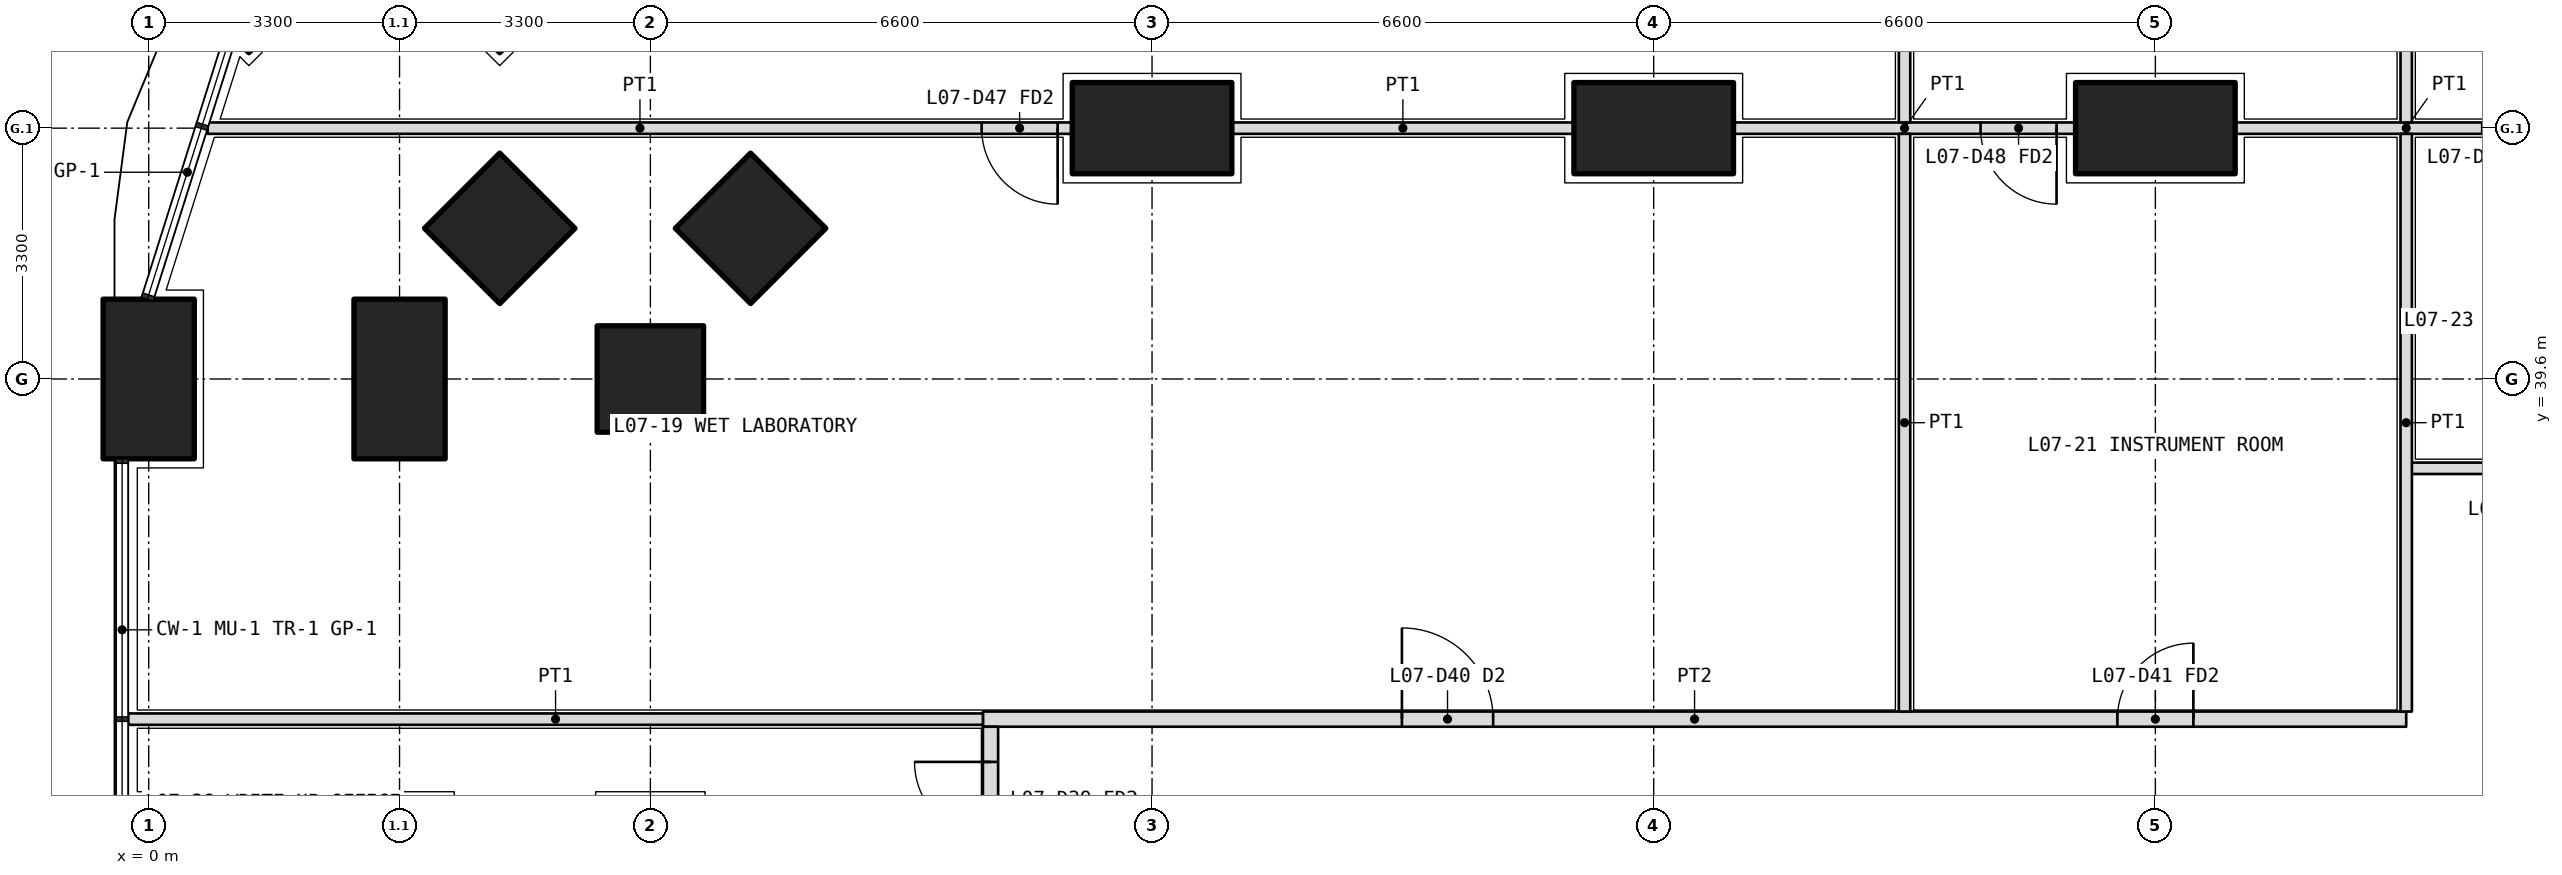
"""IFC4 building model, lengths in metres.
Left out: names, types, materials, properties, quantities, classifications, styles, units other than length and angle.
Written with IfcOpenShell. Run it as: python <this file> out.ifc"""

import sys

from ifc_helpers import new_model, si_unit, direction, frame, frame_2d, origin, origin_2d, place, context, subcontext, project, spatial, rectangle, extrude, element, fill, save


model = new_model("IFC4")
c1 = context("Model", 3, precision=1e-05, world=origin(), true_north=direction((0.0, 1.0)))
c2 = subcontext(c1, "Body", "Model", "MODEL_VIEW")
j1 = project(units=[si_unit("LENGTHUNIT", "METRE"), si_unit("PLANEANGLEUNIT", "RADIAN")], contexts=[c1])
p1 = place(None, origin())
s1 = spatial("IfcSite", under=j1, at=p1, CompositionType="ELEMENT")
p2 = place(p1, origin())
s2 = spatial("IfcBuilding", under=s1, at=p2, CompositionType="ELEMENT")
p3 = place(p2, frame((0.0, 0.0, 33.9)))
s3 = spatial("IfcBuildingStorey", under=s2, at=p3, CompositionType="ELEMENT", Elevation=33.9)
p4 = place(p3, frame((1.318, 44.882, 0.0), z_axis=(0.0, 0.0, 1.0), x_axis=(0.707106781187, 0.707106781187, 0.0)))
e1 = element("IfcColumn", 1, at=p4, inside=s3, PredefinedType="COLUMN", context=c2, shape_type="SweptSolid", body=[
    extrude(rectangle(XDim=1.4, YDim=1.4, at=origin_2d()), origin(), (0.0, 0.0, 1.0), 4.2),
])
p5 = place(p3, frame((0.0, 39.6, 0.0), z_axis=(0.0, 0.0, 1.0), x_axis=(0.0, 1.0, 0.0)))
e2 = element("IfcColumn", 2, at=p5, inside=s3, PredefinedType="COLUMN", context=c2, shape_type="SweptSolid", body=[
    extrude(rectangle(XDim=2.1, YDim=1.2, at=origin_2d()), origin(), (0.0, 0.0, 1.0), 4.2),
])
for number, where, z_axis, x_axis in (
    (3, (6.6, 39.6, 0.0), (0.0, 0.0, 1.0), (1.0, 0.0, 0.0)),
    (4, (4.618, 44.882, 0.0), (0.0, 0.0, 1.0), (0.707, 0.707, 0.0)),
):
    element("IfcColumn", number, at=place(p3, frame(where, z_axis=z_axis, x_axis=x_axis)), inside=s3, PredefinedType="COLUMN", context=c2, shape_type="SweptSolid", body=[
        extrude(rectangle(XDim=1.4, YDim=1.4, at=origin_2d()), origin(), (0.0, 0.0, 1.0), 4.2),
    ])
p6 = place(p3, frame((3.3, 39.6, 0.0), z_axis=(0.0, 0.0, 1.0), x_axis=(0.0, 1.0, 0.0)))
e5 = element("IfcColumn", 5, at=p6, inside=s3, PredefinedType="COLUMN", context=c2, shape_type="SweptSolid", body=[
    extrude(rectangle(XDim=2.1, YDim=1.2, at=origin_2d()), origin(), (0.0, 0.0, 1.0), 4.2),
])
p7 = place(p3, frame((4.618, 41.582, 0.0), z_axis=(0.0, 0.0, 1.0), x_axis=(0.707106781187, 0.707106781187, 0.0)))
e6 = element("IfcColumn", 6, at=p7, inside=s3, PredefinedType="COLUMN", context=c2, shape_type="SweptSolid", body=[
    extrude(rectangle(XDim=1.4, YDim=1.4, at=origin_2d()), origin(), (0.0, 0.0, 1.0), 4.2),
])
for number, where, z_axis, x_axis in (
    (7, (13.2, 42.9, 0.0), (0.0, 0.0, 1.0), (1.0, 0.0, 0.0)),
    (8, (19.8, 42.9, 0.0), (0.0, 0.0, 1.0), (1.0, 0.0, 0.0)),
    (9, (26.4, 42.9, 0.0), (0.0, 0.0, 1.0), (1.0, 0.0, 0.0)),
):
    element("IfcColumn", number, at=place(p3, frame(where, z_axis=z_axis, x_axis=x_axis)), inside=s3, PredefinedType="COLUMN", context=c2, shape_type="SweptSolid", body=[
        extrude(rectangle(XDim=2.1, YDim=1.2, at=origin_2d()), origin(), (0.0, 0.0, 1.0), 4.2),
    ])
p8 = place(p3, frame((7.918, 41.582, 0.0), z_axis=(0.0, 0.0, 1.0), x_axis=(0.707106781187, 0.707106781187, 0.0)))
e10 = element("IfcColumn", 10, at=p8, inside=s3, PredefinedType="COLUMN", context=c2, shape_type="SweptSolid", body=[
    extrude(rectangle(XDim=1.4, YDim=1.4, at=origin_2d()), origin(), (0.0, 0.0, 1.0), 4.2),
])
p9 = place(p3, frame((10.975, 35.125, 0.0), z_axis=(0.0, 0.0, 1.0), x_axis=(1.0, 0.0, 0.0)))
e11 = element("IfcWall", 11, at=p9, inside=s3, PredefinedType="PARTITIONING", context=c2, shape_type="SweptSolid", body=[
    extrude(rectangle(XDim=18.725, YDim=0.2, at=frame_2d((9.362, 0.0))), origin(), (0.0, 0.0, 1.0), 2.85),
])
p10 = place(p9, frame((5.512, 0.0, 0.0)))
e12 = element("IfcOpeningElement", 12, at=p10, cuts=e11, PredefinedType="OPENING", context=c2, shape_type="SweptSolid", body=[
    extrude(rectangle(XDim=1.2, YDim=2.1, at=frame_2d((0.6, 1.05))), frame((0.0, 0.11, 0.0), z_axis=(0.0, -1.0, 0.0), x_axis=(1.0, 0.0, 0.0)), (0.0, 0.0, 1.0), 0.22),
])
p11 = place(p9, frame((14.925, 0.0, 0.0)))
e13 = element("IfcOpeningElement", 13, at=p11, cuts=e11, PredefinedType="OPENING", context=c2, shape_type="SweptSolid", body=[
    extrude(rectangle(XDim=1.0, YDim=2.1, at=frame_2d((0.5, 1.05))), frame((0.0, 0.11, 0.0), z_axis=(0.0, -1.0, 0.0), x_axis=(1.0, 0.0, 0.0)), (0.0, 0.0, 1.0), 0.22),
])
p12 = place(p3, frame((11.075, 11.175, 0.0), z_axis=(0.0, 0.0, 1.0), x_axis=(0.0, 1.0, 0.0)))
e14 = element("IfcWall", 14, at=p12, inside=s3, PredefinedType="PARTITIONING", context=c2, shape_type="SweptSolid", body=[
    extrude(rectangle(XDim=23.85, YDim=0.2, at=frame_2d((11.925, 0.0))), origin(), (0.0, 0.0, 1.0), 2.85),
])
p13 = place(p12, frame((0.363, 0.0, 0.0)))
e15 = element("IfcOpeningElement", 15, at=p13, cuts=e14, PredefinedType="OPENING", context=c2, shape_type="SweptSolid", body=[
    extrude(rectangle(XDim=1.2, YDim=2.1, at=frame_2d((0.6, 1.05))), frame((0.0, 0.11, 0.0), z_axis=(0.0, -1.0, 0.0), x_axis=(1.0, 0.0, 0.0)), (0.0, 0.0, 1.0), 0.22),
])
p14 = place(p12, frame((2.575, 0.0, 0.0)))
e16 = element("IfcOpeningElement", 16, at=p14, cuts=e14, PredefinedType="OPENING", context=c2, shape_type="SweptSolid", body=[
    extrude(rectangle(XDim=1.0, YDim=2.1, at=frame_2d((0.5, 1.05))), frame((0.0, 0.11, 0.0), z_axis=(0.0, -1.0, 0.0), x_axis=(1.0, 0.0, 0.0)), (0.0, 0.0, 1.0), 0.22),
])
p15 = place(p12, frame((5.65, 0.0, 0.0)))
e17 = element("IfcOpeningElement", 17, at=p15, cuts=e14, PredefinedType="OPENING", context=c2, shape_type="SweptSolid", body=[
    extrude(rectangle(XDim=0.9, YDim=2.1, at=frame_2d((0.45, 1.05))), frame((0.0, 0.11, 0.0), z_axis=(0.0, -1.0, 0.0), x_axis=(1.0, 0.0, 0.0)), (0.0, 0.0, 1.0), 0.22),
])
p16 = place(p12, frame((9.5, 0.0, 0.0)))
e18 = element("IfcOpeningElement", 18, at=p16, cuts=e14, PredefinedType="OPENING", context=c2, shape_type="SweptSolid", body=[
    extrude(rectangle(XDim=0.9, YDim=2.1, at=frame_2d((0.45, 1.05))), frame((0.0, 0.11, 0.0), z_axis=(0.0, -1.0, 0.0), x_axis=(1.0, 0.0, 0.0)), (0.0, 0.0, 1.0), 0.22),
])
p17 = place(p12, frame((13.025, 0.0, 0.0)))
e19 = element("IfcOpeningElement", 19, at=p17, cuts=e14, PredefinedType="OPENING", context=c2, shape_type="SweptSolid", body=[
    extrude(rectangle(XDim=1.0, YDim=2.1, at=frame_2d((0.5, 1.05))), frame((0.0, 0.11, 0.0), z_axis=(0.0, -1.0, 0.0), x_axis=(1.0, 0.0, 0.0)), (0.0, 0.0, 1.0), 0.22),
])
p18 = place(p12, frame((16.375, 0.0, 0.0)))
e20 = element("IfcOpeningElement", 20, at=p18, cuts=e14, PredefinedType="OPENING", context=c2, shape_type="SweptSolid", body=[
    extrude(rectangle(XDim=1.0, YDim=2.1, at=frame_2d((0.5, 1.05))), frame((0.0, 0.11, 0.0), z_axis=(0.0, -1.0, 0.0), x_axis=(1.0, 0.0, 0.0)), (0.0, 0.0, 1.0), 0.22),
])
p19 = place(p12, frame((19.675, 0.0, 0.0)))
e21 = element("IfcOpeningElement", 21, at=p19, cuts=e14, PredefinedType="OPENING", context=c2, shape_type="SweptSolid", body=[
    extrude(rectangle(XDim=1.0, YDim=2.1, at=frame_2d((0.5, 1.05))), frame((0.0, 0.11, 0.0), z_axis=(0.0, -1.0, 0.0), x_axis=(1.0, 0.0, 0.0)), (0.0, 0.0, 1.0), 0.22),
])
p20 = place(p12, frame((22.387, 0.0, 0.0)))
e22 = element("IfcOpeningElement", 22, at=p20, cuts=e14, PredefinedType="OPENING", context=c2, shape_type="SweptSolid", body=[
    extrude(rectangle(XDim=1.0, YDim=2.1, at=frame_2d((0.5, 1.05))), frame((0.0, 0.11, 0.0), z_axis=(0.0, -1.0, 0.0), x_axis=(1.0, 0.0, 0.0)), (0.0, 0.0, 1.0), 0.22),
])
p21 = place(p3, frame((-0.27, 35.125, 0.0), z_axis=(0.0, 0.0, 1.0), x_axis=(1.0, 0.0, 0.0)))
e23 = element("IfcWall", 23, at=p21, inside=s3, PredefinedType="PARTITIONING", context=c2, shape_type="SweptSolid", body=[
    extrude(rectangle(XDim=11.245, YDim=0.15, at=frame_2d((5.623, 0.0))), origin(), (0.0, 0.0, 1.0), 2.7),
])
p22 = place(p3, frame((31.95, 42.9, 0.0), z_axis=(0.0, 0.0, 1.0), x_axis=(-1.0, 0.0, 0.0)))
e24 = element("IfcWall", 24, at=p22, inside=s3, PredefinedType="PARTITIONING", context=c2, shape_type="SweptSolid", body=[
    extrude(rectangle(XDim=4.5, YDim=0.15, at=frame_2d((2.25, 0.0))), origin(), (0.0, 0.0, 1.0), 3.9),
])
p23 = place(p22, frame((0.25, 0.0, 0.0)))
e25 = element("IfcOpeningElement", 25, at=p23, cuts=e24, PredefinedType="OPENING", context=c2, shape_type="SweptSolid", body=[
    extrude(rectangle(XDim=1.0, YDim=2.1, at=frame_2d((0.5, 1.05))), frame((0.0, 0.085, 0.0), z_axis=(0.0, -1.0, 0.0), x_axis=(1.0, 0.0, 0.0)), (0.0, 0.0, 1.0), 0.17),
])
p24 = place(p3, frame((25.35, 42.9, 0.0), z_axis=(0.0, 0.0, 1.0), x_axis=(-1.0, 0.0, 0.0)))
e26 = element("IfcWall", 26, at=p24, inside=s3, PredefinedType="PARTITIONING", context=c2, shape_type="SweptSolid", body=[
    extrude(rectangle(XDim=4.5, YDim=0.15, at=frame_2d((2.25, 0.0))), origin(), (0.0, 0.0, 1.0), 3.9),
])
p25 = place(p24, frame((0.25, 0.0, 0.0)))
e27 = element("IfcOpeningElement", 27, at=p25, cuts=e26, PredefinedType="OPENING", context=c2, shape_type="SweptSolid", body=[
    extrude(rectangle(XDim=1.0, YDim=2.1, at=frame_2d((0.5, 1.05))), frame((0.0, 0.085, 0.0), z_axis=(0.0, -1.0, 0.0), x_axis=(1.0, 0.0, 0.0)), (0.0, 0.0, 1.0), 0.17),
])
p26 = place(p3, frame((18.75, 42.9, 0.0), z_axis=(0.0, 0.0, 1.0), x_axis=(-1.0, 0.0, 0.0)))
e28 = element("IfcWall", 28, at=p26, inside=s3, PredefinedType="PARTITIONING", context=c2, shape_type="SweptSolid", body=[
    extrude(rectangle(XDim=4.5, YDim=0.15, at=frame_2d((2.25, 0.0))), origin(), (0.0, 0.0, 1.0), 3.9),
])
p27 = place(p3, frame((12.15, 42.9, 0.0), z_axis=(0.0, 0.0, 1.0), x_axis=(-1.0, 0.0, 0.0)))
e29 = element("IfcWall", 29, at=p27, inside=s3, PredefinedType="PARTITIONING", context=c2, shape_type="SweptSolid", body=[
    extrude(rectangle(XDim=11.374, YDim=0.15, at=frame_2d((5.687, 0.0))), origin(), (0.0, 0.0, 1.0), 2.7),
])
p28 = place(p27, frame((0.192, 0.0, 0.0)))
e30 = element("IfcOpeningElement", 30, at=p28, cuts=e29, PredefinedType="OPENING", context=c2, shape_type="SweptSolid", body=[
    extrude(rectangle(XDim=1.0, YDim=2.1, at=frame_2d((0.5, 1.05))), frame((0.0, 0.085, 0.0), z_axis=(0.0, -1.0, 0.0), x_axis=(1.0, 0.0, 0.0)), (0.0, 0.0, 1.0), 0.17),
])
p29 = place(p3, frame((29.7, 38.425, 0.0), z_axis=(0.0, 0.0, 1.0), x_axis=(1.0, 0.0, 0.0)))
e31 = element("IfcWall", 31, at=p29, inside=s3, PredefinedType="PARTITIONING", context=c2, shape_type="SweptSolid", body=[
    extrude(rectangle(XDim=3.3, YDim=0.15, at=frame_2d((1.65, 0.0))), origin(), (0.0, 0.0, 1.0), 2.85),
])
p30 = place(p29, frame((1.15, 0.0, 0.0)))
e32 = element("IfcOpeningElement", 32, at=p30, cuts=e31, PredefinedType="OPENING", context=c2, shape_type="SweptSolid", body=[
    extrude(rectangle(XDim=1.0, YDim=2.1, at=frame_2d((0.5, 1.05))), frame((0.0, 0.085, 0.0), z_axis=(0.0, -1.0, 0.0), x_axis=(1.0, 0.0, 0.0)), (0.0, 0.0, 1.0), 0.17),
])
p31 = place(p3, frame((23.1, 46.47, 0.0), z_axis=(0.0, 0.0, 1.0), x_axis=(0.0, -1.0, 0.0)))
e33 = element("IfcWall", 33, at=p31, inside=s3, PredefinedType="PARTITIONING", context=c2, shape_type="SweptSolid", body=[
    extrude(rectangle(XDim=3.495, YDim=0.15, at=frame_2d((1.748, 0.0))), origin(), (0.0, 0.0, 1.0), 2.7),
])
p32 = place(p3, frame((23.1, 42.825, 0.0), z_axis=(0.0, 0.0, 1.0), x_axis=(0.0, -1.0, 0.0)))
e34 = element("IfcWall", 34, at=p32, inside=s3, PredefinedType="PARTITIONING", context=c2, shape_type="SweptSolid", body=[
    extrude(rectangle(XDim=7.6, YDim=0.15, at=frame_2d((3.8, 0.0))), origin(), (0.0, 0.0, 1.0), 3.9),
])
p33 = place(p3, frame((29.7, 46.47, 0.0), z_axis=(0.0, 0.0, 1.0), x_axis=(0.0, -1.0, 0.0)))
e35 = element("IfcWall", 35, at=p33, inside=s3, PredefinedType="PARTITIONING", context=c2, shape_type="SweptSolid", body=[
    extrude(rectangle(XDim=3.495, YDim=0.15, at=frame_2d((1.748, 0.0))), origin(), (0.0, 0.0, 1.0), 2.7),
])
p34 = place(p3, frame((29.7, 42.825, 0.0), z_axis=(0.0, 0.0, 1.0), x_axis=(0.0, -1.0, 0.0)))
e36 = element("IfcWall", 36, at=p34, inside=s3, PredefinedType="PARTITIONING", context=c2, shape_type="SweptSolid", body=[
    extrude(rectangle(XDim=7.6, YDim=0.15, at=frame_2d((3.8, 0.0))), origin(), (0.0, 0.0, 1.0), 3.9),
])
p35 = place(p10, origin())
e37 = element("IfcDoor", 37, at=p35, inside=s3, OperationType="DOUBLE_DOOR_SINGLE_SWING", PredefinedType="DOOR", context=c2, shape_type="SweptSolid", body=[
    extrude(rectangle(XDim=1.2, YDim=2.1, at=frame_2d((0.6, 1.05))), frame((0.0, 0.025, 0.0), z_axis=(0.0, -1.0, 0.0), x_axis=(1.0, 0.0, 0.0)), (0.0, 0.0, 1.0), 0.05),
])
fill(e12, e37)
p36 = place(p28, origin())
e38 = element("IfcDoor", 38, at=p36, inside=s3, OperationType="SINGLE_SWING_LEFT", PredefinedType="DOOR", context=c2, shape_type="SweptSolid", body=[
    extrude(rectangle(XDim=1.0, YDim=2.1, at=frame_2d((0.5, 1.05))), frame((0.0, 0.025, 0.0), z_axis=(0.0, -1.0, 0.0), x_axis=(1.0, 0.0, 0.0)), (0.0, 0.0, 1.0), 0.05),
])
fill(e30, e38)
p37 = place(p11, origin())
e39 = element("IfcDoor", 39, at=p37, inside=s3, OperationType="SINGLE_SWING_RIGHT", PredefinedType="DOOR", context=c2, shape_type="SweptSolid", body=[
    extrude(rectangle(XDim=1.0, YDim=2.1, at=frame_2d((0.5, 1.05))), frame((0.0, 0.025, 0.0), z_axis=(0.0, -1.0, 0.0), x_axis=(1.0, 0.0, 0.0)), (0.0, 0.0, 1.0), 0.05),
])
fill(e13, e39)
p38 = place(p25, origin())
e40 = element("IfcDoor", 40, at=p38, inside=s3, OperationType="SINGLE_SWING_LEFT", PredefinedType="DOOR", context=c2, shape_type="SweptSolid", body=[
    extrude(rectangle(XDim=1.0, YDim=2.1, at=frame_2d((0.5, 1.05))), frame((0.0, 0.025, 0.0), z_axis=(0.0, -1.0, 0.0), x_axis=(1.0, 0.0, 0.0)), (0.0, 0.0, 1.0), 0.05),
])
fill(e27, e40)
p39 = place(p20, origin())
e41 = element("IfcDoor", 41, at=p39, inside=s3, OperationType="SINGLE_SWING_RIGHT", PredefinedType="DOOR", context=c2, shape_type="SweptSolid", body=[
    extrude(rectangle(XDim=1.0, YDim=2.1, at=frame_2d((0.5, 1.05))), frame((0.0, 0.025, 0.0), z_axis=(0.0, -1.0, 0.0), x_axis=(1.0, 0.0, 0.0)), (0.0, 0.0, 1.0), 0.05),
])
fill(e22, e41)
save(model, sys.argv[1])
